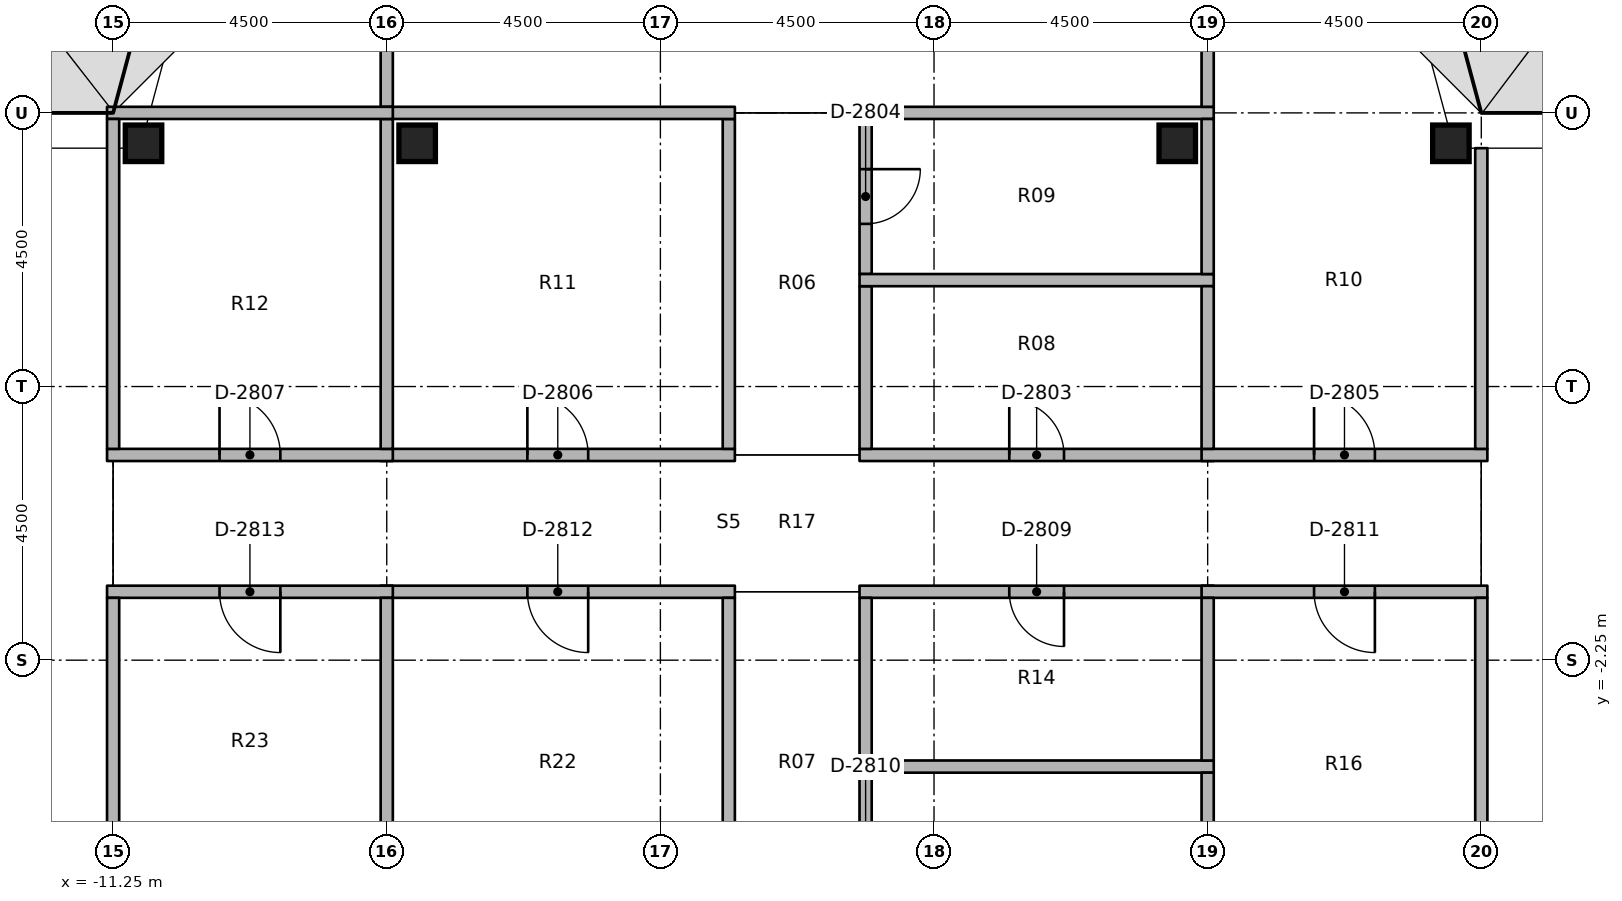
"""IFC4 building model, lengths in metres.
Left out: names, types, materials, properties, quantities, classifications, styles, units other than length and angle.
Written with IfcOpenShell. Run it as: python <this file> out.ifc"""

import sys

from ifc_helpers import new_model, si_unit, direction, frame, frame_2d, origin, origin_2d, place, context, subcontext, project, spatial, rectangle, extrude, element, fill, save


model = new_model("IFC4")
c1 = context("Model", 3, precision=1e-05, world=origin(), true_north=direction((0.0, 1.0)))
c2 = subcontext(c1, "Body", "Model", "MODEL_VIEW")
j1 = project(units=[si_unit("LENGTHUNIT", "METRE"), si_unit("PLANEANGLEUNIT", "RADIAN")], contexts=[c1])
p1 = place(None, origin())
s1 = spatial("IfcSite", under=j1, at=p1, CompositionType="ELEMENT")
p2 = place(p1, origin())
s2 = spatial("IfcBuilding", under=s1, at=p2, CompositionType="ELEMENT")
p3 = place(p2, frame((0.0, 0.0, 265.0)))
s3 = spatial("IfcBuildingStorey", under=s2, at=p3, CompositionType="ELEMENT", Elevation=265.0)
for number, where, z_axis, x_axis in (
    (1, (-10.75, 6.25, 0.0), (0.0, 0.0, 1.0), (1.0, 0.0, 0.0)),
    (2, (-6.25, 6.25, 0.0), (0.0, 0.0, 1.0), (1.0, 0.0, 0.0)),
    (3, (6.25, 6.25, 0.0), (0.0, 0.0, 1.0), (1.0, 0.0, 0.0)),
    (4, (10.75, 6.25, 0.0), (0.0, 0.0, 1.0), (1.0, 0.0, 0.0)),
):
    element("IfcColumn", number, at=place(p3, frame(where, z_axis=z_axis, x_axis=x_axis)), inside=s3, PredefinedType="COLUMN", context=c2, shape_type="SweptSolid", body=[
        extrude(rectangle(XDim=0.6, YDim=0.6, at=origin_2d()), origin(), (0.0, 0.0, 1.0), 3.65),
    ])
p4 = place(p3, frame((1.025, 1.125, 0.0), z_axis=(0.0, 0.0, 1.0), x_axis=(1.0, 0.0, 0.0)))
e5 = element("IfcWall", 5, at=p4, inside=s3, PredefinedType="PARTITIONING", context=c2, shape_type="SweptSolid", body=[
    extrude(rectangle(XDim=5.825, YDim=0.2, at=frame_2d((2.913, 0.0))), origin(), (0.0, 0.0, 1.0), 2.75),
])
p5 = place(p4, frame((2.462, 0.0, 0.0)))
e6 = element("IfcOpeningElement", 6, at=p5, cuts=e5, PredefinedType="OPENING", context=c2, shape_type="SweptSolid", body=[
    extrude(rectangle(XDim=0.9, YDim=2.1, at=frame_2d((0.45, 1.05))), frame((0.0, 0.11, 0.0), z_axis=(0.0, -1.0, 0.0), x_axis=(1.0, 0.0, 0.0)), (0.0, 0.0, 1.0), 0.22),
])
p6 = place(p3, frame((6.65, 1.125, 0.0), z_axis=(0.0, 0.0, 1.0), x_axis=(1.0, 0.0, 0.0)))
e7 = element("IfcWall", 7, at=p6, inside=s3, PredefinedType="PARTITIONING", context=c2, shape_type="SweptSolid", body=[
    extrude(rectangle(XDim=4.7, YDim=0.2, at=frame_2d((2.35, 0.0))), origin(), (0.0, 0.0, 1.0), 2.75),
])
p7 = place(p6, frame((1.85, 0.0, 0.0)))
e8 = element("IfcOpeningElement", 8, at=p7, cuts=e7, PredefinedType="OPENING", context=c2, shape_type="SweptSolid", body=[
    extrude(rectangle(XDim=1.0, YDim=2.1, at=frame_2d((0.5, 1.05))), frame((0.0, 0.11, 0.0), z_axis=(0.0, -1.0, 0.0), x_axis=(1.0, 0.0, 0.0)), (0.0, 0.0, 1.0), 0.22),
])
p8 = place(p3, frame((-6.85, 1.125, 0.0), z_axis=(0.0, 0.0, 1.0), x_axis=(1.0, 0.0, 0.0)))
e9 = element("IfcWall", 9, at=p8, inside=s3, PredefinedType="PARTITIONING", context=c2, shape_type="SweptSolid", body=[
    extrude(rectangle(XDim=5.825, YDim=0.2, at=frame_2d((2.913, 0.0))), origin(), (0.0, 0.0, 1.0), 2.75),
])
p9 = place(p8, frame((2.413, 0.0, 0.0)))
e10 = element("IfcOpeningElement", 10, at=p9, cuts=e9, PredefinedType="OPENING", context=c2, shape_type="SweptSolid", body=[
    extrude(rectangle(XDim=1.0, YDim=2.1, at=frame_2d((0.5, 1.05))), frame((0.0, 0.11, 0.0), z_axis=(0.0, -1.0, 0.0), x_axis=(1.0, 0.0, 0.0)), (0.0, 0.0, 1.0), 0.22),
])
p10 = place(p3, frame((-11.35, 1.125, 0.0), z_axis=(0.0, 0.0, 1.0), x_axis=(1.0, 0.0, 0.0)))
e11 = element("IfcWall", 11, at=p10, inside=s3, PredefinedType="PARTITIONING", context=c2, shape_type="SweptSolid", body=[
    extrude(rectangle(XDim=4.7, YDim=0.2, at=frame_2d((2.35, 0.0))), origin(), (0.0, 0.0, 1.0), 2.75),
])
p11 = place(p10, frame((1.85, 0.0, 0.0)))
e12 = element("IfcOpeningElement", 12, at=p11, cuts=e11, PredefinedType="OPENING", context=c2, shape_type="SweptSolid", body=[
    extrude(rectangle(XDim=1.0, YDim=2.1, at=frame_2d((0.5, 1.05))), frame((0.0, 0.11, 0.0), z_axis=(0.0, -1.0, 0.0), x_axis=(1.0, 0.0, 0.0)), (0.0, 0.0, 1.0), 0.22),
])
p12 = place(p3, frame((6.85, -1.125, 0.0), z_axis=(0.0, 0.0, 1.0), x_axis=(-1.0, 0.0, 0.0)))
e13 = element("IfcWall", 13, at=p12, inside=s3, PredefinedType="PARTITIONING", context=c2, shape_type="SweptSolid", body=[
    extrude(rectangle(XDim=5.825, YDim=0.2, at=frame_2d((2.913, 0.0))), origin(), (0.0, 0.0, 1.0), 2.75),
])
p13 = place(p12, frame((2.462, 0.0, 0.0)))
e14 = element("IfcOpeningElement", 14, at=p13, cuts=e13, PredefinedType="OPENING", context=c2, shape_type="SweptSolid", body=[
    extrude(rectangle(XDim=0.9, YDim=2.1, at=frame_2d((0.45, 1.05))), frame((0.0, 0.11, 0.0), z_axis=(0.0, -1.0, 0.0), x_axis=(1.0, 0.0, 0.0)), (0.0, 0.0, 1.0), 0.22),
])
p14 = place(p3, frame((11.35, -1.125, 0.0), z_axis=(0.0, 0.0, 1.0), x_axis=(-1.0, 0.0, 0.0)))
e15 = element("IfcWall", 15, at=p14, inside=s3, PredefinedType="PARTITIONING", context=c2, shape_type="SweptSolid", body=[
    extrude(rectangle(XDim=4.7, YDim=0.2, at=frame_2d((2.35, 0.0))), origin(), (0.0, 0.0, 1.0), 2.75),
])
p15 = place(p14, frame((1.85, 0.0, 0.0)))
e16 = element("IfcOpeningElement", 16, at=p15, cuts=e15, PredefinedType="OPENING", context=c2, shape_type="SweptSolid", body=[
    extrude(rectangle(XDim=1.0, YDim=2.1, at=frame_2d((0.5, 1.05))), frame((0.0, 0.11, 0.0), z_axis=(0.0, -1.0, 0.0), x_axis=(1.0, 0.0, 0.0)), (0.0, 0.0, 1.0), 0.22),
])
p16 = place(p3, frame((-1.025, -1.125, 0.0), z_axis=(0.0, 0.0, 1.0), x_axis=(-1.0, 0.0, 0.0)))
e17 = element("IfcWall", 17, at=p16, inside=s3, PredefinedType="PARTITIONING", context=c2, shape_type="SweptSolid", body=[
    extrude(rectangle(XDim=5.825, YDim=0.2, at=frame_2d((2.913, 0.0))), origin(), (0.0, 0.0, 1.0), 2.75),
])
p17 = place(p16, frame((2.413, 0.0, 0.0)))
e18 = element("IfcOpeningElement", 18, at=p17, cuts=e17, PredefinedType="OPENING", context=c2, shape_type="SweptSolid", body=[
    extrude(rectangle(XDim=1.0, YDim=2.1, at=frame_2d((0.5, 1.05))), frame((0.0, 0.11, 0.0), z_axis=(0.0, -1.0, 0.0), x_axis=(1.0, 0.0, 0.0)), (0.0, 0.0, 1.0), 0.22),
])
p18 = place(p3, frame((-6.65, -1.125, 0.0), z_axis=(0.0, 0.0, 1.0), x_axis=(-1.0, 0.0, 0.0)))
e19 = element("IfcWall", 19, at=p18, inside=s3, PredefinedType="PARTITIONING", context=c2, shape_type="SweptSolid", body=[
    extrude(rectangle(XDim=4.7, YDim=0.2, at=frame_2d((2.35, 0.0))), origin(), (0.0, 0.0, 1.0), 2.75),
])
p19 = place(p18, frame((1.85, 0.0, 0.0)))
e20 = element("IfcOpeningElement", 20, at=p19, cuts=e19, PredefinedType="OPENING", context=c2, shape_type="SweptSolid", body=[
    extrude(rectangle(XDim=1.0, YDim=2.1, at=frame_2d((0.5, 1.05))), frame((0.0, 0.11, 0.0), z_axis=(0.0, -1.0, 0.0), x_axis=(1.0, 0.0, 0.0)), (0.0, 0.0, 1.0), 0.22),
])
p20 = place(p3, frame((1.125, 1.225, 0.0), z_axis=(0.0, 0.0, 1.0), x_axis=(0.0, 1.0, 0.0)))
e21 = element("IfcWall", 21, at=p20, inside=s3, PredefinedType="PARTITIONING", context=c2, shape_type="SweptSolid", body=[
    extrude(rectangle(XDim=2.675, YDim=0.2, at=frame_2d((1.337, 0.0))), origin(), (0.0, 0.0, 1.0), 2.75),
])
p21 = place(p3, frame((1.125, 6.65, 0.0), z_axis=(0.0, 0.0, 1.0), x_axis=(0.0, -1.0, 0.0)))
e22 = element("IfcWall", 22, at=p21, inside=s3, PredefinedType="PARTITIONING", context=c2, shape_type="SweptSolid", body=[
    extrude(rectangle(XDim=2.55, YDim=0.2, at=frame_2d((1.275, 0.0))), origin(), (0.0, 0.0, 1.0), 2.75),
])
p22 = place(p21, frame((0.825, 0.0, 0.0)))
e23 = element("IfcOpeningElement", 23, at=p22, cuts=e22, PredefinedType="OPENING", context=c2, shape_type="SweptSolid", body=[
    extrude(rectangle(XDim=0.9, YDim=2.1, at=frame_2d((0.45, 1.05))), frame((0.0, 0.11, 0.0), z_axis=(0.0, -1.0, 0.0), x_axis=(1.0, 0.0, 0.0)), (0.0, 0.0, 1.0), 0.22),
])
p23 = place(p3, frame((-1.125, 1.225, 0.0), z_axis=(0.0, 0.0, 1.0), x_axis=(0.0, 1.0, 0.0)))
e24 = element("IfcWall", 24, at=p23, inside=s3, PredefinedType="PARTITIONING", context=c2, shape_type="SweptSolid", body=[
    extrude(rectangle(XDim=5.425, YDim=0.2, at=frame_2d((2.712, 0.0))), origin(), (0.0, 0.0, 1.0), 2.75),
])
p24 = place(p3, frame((1.125, -3.9, 0.0), z_axis=(0.0, 0.0, 1.0), x_axis=(0.0, 1.0, 0.0)))
e25 = element("IfcWall", 25, at=p24, inside=s3, PredefinedType="PARTITIONING", context=c2, shape_type="SweptSolid", body=[
    extrude(rectangle(XDim=2.675, YDim=0.2, at=frame_2d((1.337, 0.0))), origin(), (0.0, 0.0, 1.0), 2.75),
])
p25 = place(p3, frame((1.125, -4.1, 0.0), z_axis=(0.0, 0.0, 1.0), x_axis=(0.0, -1.0, 0.0)))
e26 = element("IfcWall", 26, at=p25, inside=s3, PredefinedType="PARTITIONING", context=c2, shape_type="SweptSolid", body=[
    extrude(rectangle(XDim=2.55, YDim=0.2, at=frame_2d((1.275, 0.0))), origin(), (0.0, 0.0, 1.0), 2.75),
])
p26 = place(p25, frame((0.825, 0.0, 0.0)))
e27 = element("IfcOpeningElement", 27, at=p26, cuts=e26, PredefinedType="OPENING", context=c2, shape_type="SweptSolid", body=[
    extrude(rectangle(XDim=0.9, YDim=2.1, at=frame_2d((0.45, 1.05))), frame((0.0, 0.11, 0.0), z_axis=(0.0, -1.0, 0.0), x_axis=(1.0, 0.0, 0.0)), (0.0, 0.0, 1.0), 0.22),
])
p27 = place(p3, frame((-1.125, -6.65, 0.0), z_axis=(0.0, 0.0, 1.0), x_axis=(0.0, 1.0, 0.0)))
e28 = element("IfcWall", 28, at=p27, inside=s3, PredefinedType="PARTITIONING", context=c2, shape_type="SweptSolid", body=[
    extrude(rectangle(XDim=5.425, YDim=0.2, at=frame_2d((2.712, 0.0))), origin(), (0.0, 0.0, 1.0), 2.75),
])
p28 = place(p3, frame((1.025, 6.75, 0.0), z_axis=(0.0, 0.0, 1.0), x_axis=(1.0, 0.0, 0.0)))
e29 = element("IfcWall", 29, at=p28, inside=s3, PredefinedType="PARTITIONING", context=c2, shape_type="SweptSolid", body=[
    extrude(rectangle(XDim=5.825, YDim=0.2, at=frame_2d((2.913, 0.0))), origin(), (0.0, 0.0, 1.0), 2.75),
])
p29 = place(p3, frame((6.75, 6.85, 0.0), z_axis=(0.0, 0.0, 1.0), x_axis=(0.0, 1.0, 0.0)))
e30 = element("IfcWall", 30, at=p29, inside=s3, PredefinedType="PARTITIONING", context=c2, shape_type="SweptSolid", body=[
    extrude(rectangle(XDim=3.78, YDim=0.2, at=frame_2d((1.89, 0.0))), origin(), (0.0, 0.0, 1.0), 2.75),
])
p30 = place(p3, frame((-6.85, 6.75, 0.0), z_axis=(0.0, 0.0, 1.0), x_axis=(1.0, 0.0, 0.0)))
e31 = element("IfcWall", 31, at=p30, inside=s3, PredefinedType="PARTITIONING", context=c2, shape_type="SweptSolid", body=[
    extrude(rectangle(XDim=5.825, YDim=0.2, at=frame_2d((2.913, 0.0))), origin(), (0.0, 0.0, 1.0), 2.75),
])
p31 = place(p3, frame((-6.75, 6.85, 0.0), z_axis=(0.0, 0.0, 1.0), x_axis=(0.0, 1.0, 0.0)))
e32 = element("IfcWall", 32, at=p31, inside=s3, PredefinedType="PARTITIONING", context=c2, shape_type="SweptSolid", body=[
    extrude(rectangle(XDim=3.78, YDim=0.2, at=frame_2d((1.89, 0.0))), origin(), (0.0, 0.0, 1.0), 2.75),
])
p32 = place(p31, frame((1.44, 0.0, 0.0)))
e33 = element("IfcOpeningElement", 33, at=p32, cuts=e32, PredefinedType="OPENING", context=c2, shape_type="SweptSolid", body=[
    extrude(rectangle(XDim=0.9, YDim=2.1, at=frame_2d((0.45, 1.05))), frame((0.0, 0.11, 0.0), z_axis=(0.0, -1.0, 0.0), x_axis=(1.0, 0.0, 0.0)), (0.0, 0.0, 1.0), 0.22),
])
p33 = place(p3, frame((1.025, 4.0, 0.0), z_axis=(0.0, 0.0, 1.0), x_axis=(1.0, 0.0, 0.0)))
e34 = element("IfcWall", 34, at=p33, inside=s3, PredefinedType="PARTITIONING", context=c2, shape_type="SweptSolid", body=[
    extrude(rectangle(XDim=5.825, YDim=0.2, at=frame_2d((2.913, 0.0))), origin(), (0.0, 0.0, 1.0), 2.75),
])
p34 = place(p3, frame((6.75, 1.225, 0.0), z_axis=(0.0, 0.0, 1.0), x_axis=(0.0, 1.0, 0.0)))
e35 = element("IfcWall", 35, at=p34, inside=s3, PredefinedType="PARTITIONING", context=c2, shape_type="SweptSolid", body=[
    extrude(rectangle(XDim=2.675, YDim=0.2, at=frame_2d((1.337, 0.0))), origin(), (0.0, 0.0, 1.0), 2.75),
])
p35 = place(p3, frame((6.75, 4.1, 0.0), z_axis=(0.0, 0.0, 1.0), x_axis=(0.0, 1.0, 0.0)))
e36 = element("IfcWall", 36, at=p35, inside=s3, PredefinedType="PARTITIONING", context=c2, shape_type="SweptSolid", body=[
    extrude(rectangle(XDim=2.55, YDim=0.2, at=frame_2d((1.275, 0.0))), origin(), (0.0, 0.0, 1.0), 2.75),
])
p36 = place(p3, frame((11.25, 1.225, 0.0), z_axis=(0.0, 0.0, 1.0), x_axis=(0.0, 1.0, 0.0)))
e37 = element("IfcWall", 37, at=p36, inside=s3, PredefinedType="PARTITIONING", context=c2, shape_type="SweptSolid", body=[
    extrude(rectangle(XDim=4.945, YDim=0.2, at=frame_2d((2.472, 0.0))), origin(), (0.0, 0.0, 1.0), 2.75),
])
p37 = place(p3, frame((-6.75, 1.225, 0.0), z_axis=(0.0, 0.0, 1.0), x_axis=(0.0, 1.0, 0.0)))
e38 = element("IfcWall", 38, at=p37, inside=s3, PredefinedType="PARTITIONING", context=c2, shape_type="SweptSolid", body=[
    extrude(rectangle(XDim=5.425, YDim=0.2, at=frame_2d((2.712, 0.0))), origin(), (0.0, 0.0, 1.0), 2.75),
])
p38 = place(p3, frame((-11.35, 6.75, 0.0), z_axis=(0.0, 0.0, 1.0), x_axis=(1.0, 0.0, 0.0)))
e39 = element("IfcWall", 39, at=p38, inside=s3, PredefinedType="PARTITIONING", context=c2, shape_type="SweptSolid", body=[
    extrude(rectangle(XDim=4.7, YDim=0.2, at=frame_2d((2.35, 0.0))), origin(), (0.0, 0.0, 1.0), 2.75),
])
p39 = place(p3, frame((-11.25, 1.225, 0.0), z_axis=(0.0, 0.0, 1.0), x_axis=(0.0, 1.0, 0.0)))
e40 = element("IfcWall", 40, at=p39, inside=s3, PredefinedType="PARTITIONING", context=c2, shape_type="SweptSolid", body=[
    extrude(rectangle(XDim=5.425, YDim=0.2, at=frame_2d((2.712, 0.0))), origin(), (0.0, 0.0, 1.0), 2.75),
])
p40 = place(p3, frame((1.025, -4.0, 0.0), z_axis=(0.0, 0.0, 1.0), x_axis=(1.0, 0.0, 0.0)))
e41 = element("IfcWall", 41, at=p40, inside=s3, PredefinedType="PARTITIONING", context=c2, shape_type="SweptSolid", body=[
    extrude(rectangle(XDim=5.825, YDim=0.2, at=frame_2d((2.913, 0.0))), origin(), (0.0, 0.0, 1.0), 2.75),
])
p41 = place(p3, frame((6.75, -3.9, 0.0), z_axis=(0.0, 0.0, 1.0), x_axis=(0.0, 1.0, 0.0)))
e42 = element("IfcWall", 42, at=p41, inside=s3, PredefinedType="PARTITIONING", context=c2, shape_type="SweptSolid", body=[
    extrude(rectangle(XDim=2.675, YDim=0.2, at=frame_2d((1.337, 0.0))), origin(), (0.0, 0.0, 1.0), 2.75),
])
p42 = place(p3, frame((6.75, -6.65, 0.0), z_axis=(0.0, 0.0, 1.0), x_axis=(0.0, 1.0, 0.0)))
e43 = element("IfcWall", 43, at=p42, inside=s3, PredefinedType="PARTITIONING", context=c2, shape_type="SweptSolid", body=[
    extrude(rectangle(XDim=2.55, YDim=0.2, at=frame_2d((1.275, 0.0))), origin(), (0.0, 0.0, 1.0), 2.75),
])
p43 = place(p3, frame((11.25, -6.17, 0.0), z_axis=(0.0, 0.0, 1.0), x_axis=(0.0, 1.0, 0.0)))
e44 = element("IfcWall", 44, at=p43, inside=s3, PredefinedType="PARTITIONING", context=c2, shape_type="SweptSolid", body=[
    extrude(rectangle(XDim=4.945, YDim=0.2, at=frame_2d((2.472, 0.0))), origin(), (0.0, 0.0, 1.0), 2.75),
])
p44 = place(p3, frame((-6.75, -6.65, 0.0), z_axis=(0.0, 0.0, 1.0), x_axis=(0.0, 1.0, 0.0)))
e45 = element("IfcWall", 45, at=p44, inside=s3, PredefinedType="PARTITIONING", context=c2, shape_type="SweptSolid", body=[
    extrude(rectangle(XDim=5.425, YDim=0.2, at=frame_2d((2.712, 0.0))), origin(), (0.0, 0.0, 1.0), 2.75),
])
p45 = place(p3, frame((-11.25, -6.17, 0.0), z_axis=(0.0, 0.0, 1.0), x_axis=(0.0, 1.0, 0.0)))
e46 = element("IfcWall", 46, at=p45, inside=s3, PredefinedType="PARTITIONING", context=c2, shape_type="SweptSolid", body=[
    extrude(rectangle(XDim=4.945, YDim=0.2, at=frame_2d((2.472, 0.0))), origin(), (0.0, 0.0, 1.0), 2.75),
])
p46 = place(p5, origin())
e47 = element("IfcDoor", 47, at=p46, inside=s3, OperationType="SINGLE_SWING_RIGHT", PredefinedType="DOOR", context=c2, shape_type="SweptSolid", body=[
    extrude(rectangle(XDim=0.9, YDim=2.1, at=frame_2d((0.45, 1.05))), frame((0.0, 0.025, 0.0), z_axis=(0.0, -1.0, 0.0), x_axis=(1.0, 0.0, 0.0)), (0.0, 0.0, 1.0), 0.05),
])
fill(e6, e47)
p47 = place(p22, origin())
e48 = element("IfcDoor", 48, at=p47, inside=s3, OperationType="SINGLE_SWING_RIGHT", PredefinedType="DOOR", context=c2, shape_type="SweptSolid", body=[
    extrude(rectangle(XDim=0.9, YDim=2.1, at=frame_2d((0.45, 1.05))), frame((0.0, 0.025, 0.0), z_axis=(0.0, -1.0, 0.0), x_axis=(1.0, 0.0, 0.0)), (0.0, 0.0, 1.0), 0.05),
])
fill(e23, e48)
p48 = place(p7, origin())
e49 = element("IfcDoor", 49, at=p48, inside=s3, OperationType="SINGLE_SWING_RIGHT", PredefinedType="DOOR", context=c2, shape_type="SweptSolid", body=[
    extrude(rectangle(XDim=1.0, YDim=2.1, at=frame_2d((0.5, 1.05))), frame((0.0, 0.025, 0.0), z_axis=(0.0, -1.0, 0.0), x_axis=(1.0, 0.0, 0.0)), (0.0, 0.0, 1.0), 0.05),
])
fill(e8, e49)
p49 = place(p9, origin())
e50 = element("IfcDoor", 50, at=p49, inside=s3, OperationType="SINGLE_SWING_RIGHT", PredefinedType="DOOR", context=c2, shape_type="SweptSolid", body=[
    extrude(rectangle(XDim=1.0, YDim=2.1, at=frame_2d((0.5, 1.05))), frame((0.0, 0.025, 0.0), z_axis=(0.0, -1.0, 0.0), x_axis=(1.0, 0.0, 0.0)), (0.0, 0.0, 1.0), 0.05),
])
fill(e10, e50)
p50 = place(p11, origin())
e51 = element("IfcDoor", 51, at=p50, inside=s3, OperationType="SINGLE_SWING_RIGHT", PredefinedType="DOOR", context=c2, shape_type="SweptSolid", body=[
    extrude(rectangle(XDim=1.0, YDim=2.1, at=frame_2d((0.5, 1.05))), frame((0.0, 0.025, 0.0), z_axis=(0.0, -1.0, 0.0), x_axis=(1.0, 0.0, 0.0)), (0.0, 0.0, 1.0), 0.05),
])
fill(e12, e51)
p51 = place(p13, origin())
e52 = element("IfcDoor", 52, at=p51, inside=s3, OperationType="SINGLE_SWING_RIGHT", PredefinedType="DOOR", context=c2, shape_type="SweptSolid", body=[
    extrude(rectangle(XDim=0.9, YDim=2.1, at=frame_2d((0.45, 1.05))), frame((0.0, 0.025, 0.0), z_axis=(0.0, -1.0, 0.0), x_axis=(1.0, 0.0, 0.0)), (0.0, 0.0, 1.0), 0.05),
])
fill(e14, e52)
p52 = place(p15, origin())
e53 = element("IfcDoor", 53, at=p52, inside=s3, OperationType="SINGLE_SWING_RIGHT", PredefinedType="DOOR", context=c2, shape_type="SweptSolid", body=[
    extrude(rectangle(XDim=1.0, YDim=2.1, at=frame_2d((0.5, 1.05))), frame((0.0, 0.025, 0.0), z_axis=(0.0, -1.0, 0.0), x_axis=(1.0, 0.0, 0.0)), (0.0, 0.0, 1.0), 0.05),
])
fill(e16, e53)
p53 = place(p17, origin())
e54 = element("IfcDoor", 54, at=p53, inside=s3, OperationType="SINGLE_SWING_RIGHT", PredefinedType="DOOR", context=c2, shape_type="SweptSolid", body=[
    extrude(rectangle(XDim=1.0, YDim=2.1, at=frame_2d((0.5, 1.05))), frame((0.0, 0.025, 0.0), z_axis=(0.0, -1.0, 0.0), x_axis=(1.0, 0.0, 0.0)), (0.0, 0.0, 1.0), 0.05),
])
fill(e18, e54)
p54 = place(p19, origin())
e55 = element("IfcDoor", 55, at=p54, inside=s3, OperationType="SINGLE_SWING_RIGHT", PredefinedType="DOOR", context=c2, shape_type="SweptSolid", body=[
    extrude(rectangle(XDim=1.0, YDim=2.1, at=frame_2d((0.5, 1.05))), frame((0.0, 0.025, 0.0), z_axis=(0.0, -1.0, 0.0), x_axis=(1.0, 0.0, 0.0)), (0.0, 0.0, 1.0), 0.05),
])
fill(e20, e55)
save(model, sys.argv[1])
